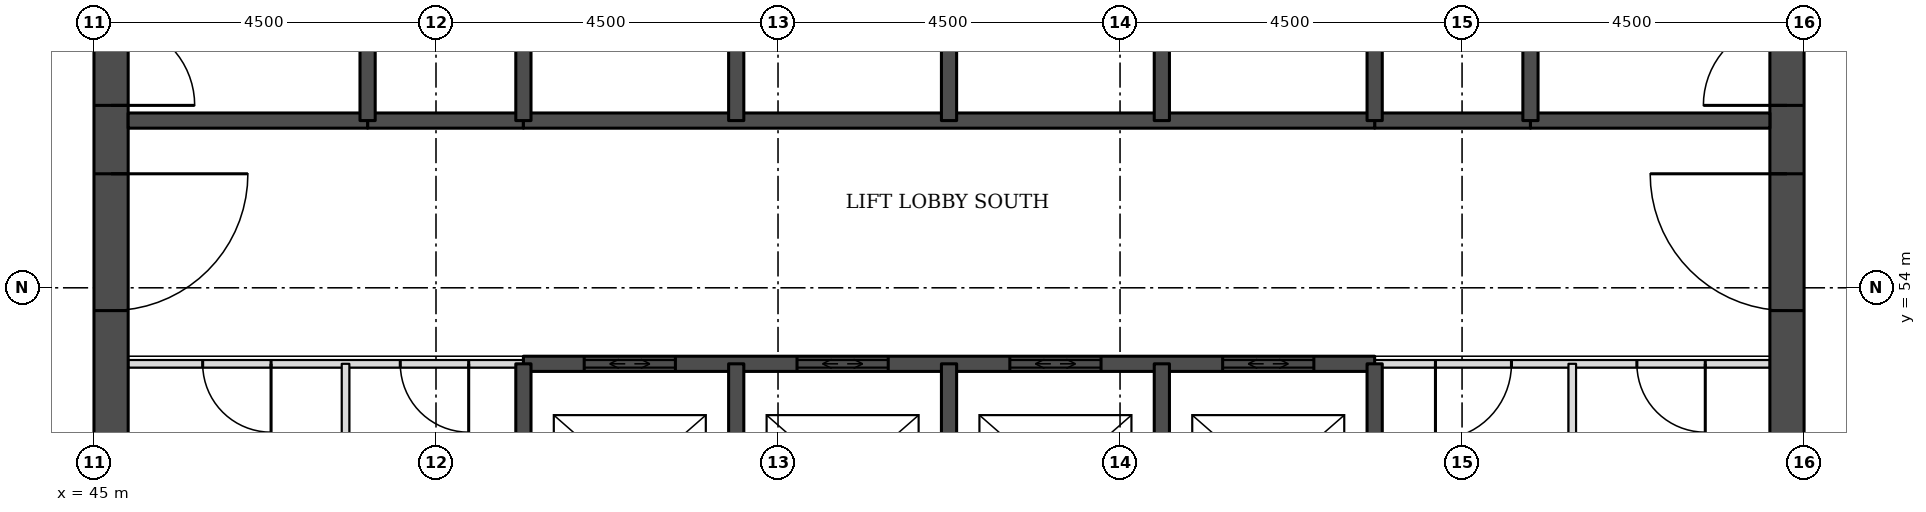
"""IFC4 building model, lengths in metres.
Left out: names, types, materials, properties, quantities, classifications, styles, units other than length and angle.
Written with IfcOpenShell. Run it as: python <this file> out.ifc"""

import sys

from ifc_helpers import new_model, si_unit, direction, frame, frame_2d, origin, place, context, subcontext, project, spatial, rectangle, extrude, element, fill, save


model = new_model("IFC4")
c1 = context("Model", 3, precision=1e-05, world=origin(), true_north=direction((0.0, 1.0)))
c2 = subcontext(c1, "Body", "Model", "MODEL_VIEW")
j1 = project(units=[si_unit("LENGTHUNIT", "METRE"), si_unit("PLANEANGLEUNIT", "RADIAN")], contexts=[c1])
p1 = place(None, origin())
s1 = spatial("IfcSite", under=j1, at=p1, CompositionType="ELEMENT")
p2 = place(p1, origin())
s2 = spatial("IfcBuilding", under=s1, at=p2, CompositionType="ELEMENT")
p3 = place(p2, frame((0.0, 0.0, 112.2)))
s3 = spatial("IfcBuildingStorey", under=s2, at=p3, CompositionType="ELEMENT", Elevation=112.2)
p4 = place(p3, frame((45.225, 49.5, 0.0), z_axis=(0.0, 0.0, 1.0), x_axis=(0.0, 1.0, 0.0)))
e1 = element("IfcWall", 1, at=p4, inside=s3, PredefinedType="SHEAR", context=c2, shape_type="SweptSolid", body=[
    extrude(rectangle(XDim=22.5, YDim=0.45, at=frame_2d((11.25, 0.0))), origin(), (0.0, 0.0, 1.0), 3.7),
])
p5 = place(p4, frame((4.2, 0.0, 0.0)))
e2 = element("IfcOpeningElement", 2, at=p5, cuts=e1, PredefinedType="OPENING", context=c2, shape_type="SweptSolid", body=[
    extrude(rectangle(XDim=1.8, YDim=2.1, at=frame_2d((0.9, 1.05))), frame((0.0, 0.235, 0.0), z_axis=(0.0, -1.0, 0.0), x_axis=(1.0, 0.0, 0.0)), (0.0, 0.0, 1.0), 0.47),
])
p6 = place(p4, frame((6.9, 0.0, 0.0)))
e3 = element("IfcOpeningElement", 3, at=p6, cuts=e1, PredefinedType="OPENING", context=c2, shape_type="SweptSolid", body=[
    extrude(rectangle(XDim=1.1, YDim=2.1, at=frame_2d((0.55, 1.05))), frame((0.0, 0.235, 0.0), z_axis=(0.0, -1.0, 0.0), x_axis=(1.0, 0.0, 0.0)), (0.0, 0.0, 1.0), 0.47),
])
p7 = place(p4, frame((13.6, 0.0, 0.0)))
e4 = element("IfcOpeningElement", 4, at=p7, cuts=e1, PredefinedType="OPENING", context=c2, shape_type="SweptSolid", body=[
    extrude(rectangle(XDim=1.1, YDim=2.1, at=frame_2d((0.55, 1.05))), frame((0.0, 0.235, 0.0), z_axis=(0.0, -1.0, 0.0), x_axis=(1.0, 0.0, 0.0)), (0.0, 0.0, 1.0), 0.47),
])
p8 = place(p4, frame((16.5, 0.0, 0.0)))
e5 = element("IfcOpeningElement", 5, at=p8, cuts=e1, PredefinedType="OPENING", context=c2, shape_type="SweptSolid", body=[
    extrude(rectangle(XDim=1.8, YDim=2.1, at=frame_2d((0.9, 1.05))), frame((0.0, 0.235, 0.0), z_axis=(0.0, -1.0, 0.0), x_axis=(1.0, 0.0, 0.0)), (0.0, 0.0, 1.0), 0.47),
])
p9 = place(p3, frame((67.275, 49.5, 0.0), z_axis=(0.0, 0.0, 1.0), x_axis=(0.0, 1.0, 0.0)))
e6 = element("IfcWall", 6, at=p9, inside=s3, PredefinedType="SHEAR", context=c2, shape_type="SweptSolid", body=[
    extrude(rectangle(XDim=22.5, YDim=0.45, at=frame_2d((11.25, 0.0))), origin(), (0.0, 0.0, 1.0), 3.7),
])
p10 = place(p9, frame((4.2, 0.0, 0.0)))
e7 = element("IfcOpeningElement", 7, at=p10, cuts=e6, PredefinedType="OPENING", context=c2, shape_type="SweptSolid", body=[
    extrude(rectangle(XDim=1.8, YDim=2.1, at=frame_2d((0.9, 1.05))), frame((0.0, 0.235, 0.0), z_axis=(0.0, -1.0, 0.0), x_axis=(1.0, 0.0, 0.0)), (0.0, 0.0, 1.0), 0.47),
])
p11 = place(p9, frame((6.9, 0.0, 0.0)))
e8 = element("IfcOpeningElement", 8, at=p11, cuts=e6, PredefinedType="OPENING", context=c2, shape_type="SweptSolid", body=[
    extrude(rectangle(XDim=1.1, YDim=2.1, at=frame_2d((0.55, 1.05))), frame((0.0, 0.235, 0.0), z_axis=(0.0, -1.0, 0.0), x_axis=(1.0, 0.0, 0.0)), (0.0, 0.0, 1.0), 0.47),
])
p12 = place(p9, frame((13.6, 0.0, 0.0)))
e9 = element("IfcOpeningElement", 9, at=p12, cuts=e6, PredefinedType="OPENING", context=c2, shape_type="SweptSolid", body=[
    extrude(rectangle(XDim=1.1, YDim=2.1, at=frame_2d((0.55, 1.05))), frame((0.0, 0.235, 0.0), z_axis=(0.0, -1.0, 0.0), x_axis=(1.0, 0.0, 0.0)), (0.0, 0.0, 1.0), 0.47),
])
p13 = place(p9, frame((16.5, 0.0, 0.0)))
e10 = element("IfcOpeningElement", 10, at=p13, cuts=e6, PredefinedType="OPENING", context=c2, shape_type="SweptSolid", body=[
    extrude(rectangle(XDim=1.8, YDim=2.1, at=frame_2d((0.9, 1.05))), frame((0.0, 0.235, 0.0), z_axis=(0.0, -1.0, 0.0), x_axis=(1.0, 0.0, 0.0)), (0.0, 0.0, 1.0), 0.47),
])
p14 = place(p3, frame((45.45, 53.0, 0.0), z_axis=(0.0, 0.0, 1.0), x_axis=(1.0, 0.0, 0.0)))
e11 = element("IfcWall", 11, at=p14, inside=s3, PredefinedType="PARTITIONING", context=c2, shape_type="SweptSolid", body=[
    extrude(rectangle(XDim=5.2, YDim=0.1, at=frame_2d((2.6, 0.0))), origin(), (0.0, 0.0, 1.0), 3.55),
])
p15 = place(p14, frame((0.98, 0.0, 0.0)))
e12 = element("IfcOpeningElement", 12, at=p15, cuts=e11, PredefinedType="OPENING", context=c2, shape_type="SweptSolid", body=[
    extrude(rectangle(XDim=0.9, YDim=2.1, at=frame_2d((0.45, 1.05))), frame((0.0, 0.06, 0.0), z_axis=(0.0, -1.0, 0.0), x_axis=(1.0, 0.0, 0.0)), (0.0, 0.0, 1.0), 0.12),
])
p16 = place(p14, frame((3.58, 0.0, 0.0)))
e13 = element("IfcOpeningElement", 13, at=p16, cuts=e11, PredefinedType="OPENING", context=c2, shape_type="SweptSolid", body=[
    extrude(rectangle(XDim=0.9, YDim=2.1, at=frame_2d((0.45, 1.05))), frame((0.0, 0.06, 0.0), z_axis=(0.0, -1.0, 0.0), x_axis=(1.0, 0.0, 0.0)), (0.0, 0.0, 1.0), 0.12),
])
p17 = place(p3, frame((61.85, 53.0, 0.0), z_axis=(0.0, 0.0, 1.0), x_axis=(1.0, 0.0, 0.0)))
e14 = element("IfcWall", 14, at=p17, inside=s3, PredefinedType="PARTITIONING", context=c2, shape_type="SweptSolid", body=[
    extrude(rectangle(XDim=5.2, YDim=0.1, at=frame_2d((2.6, 0.0))), origin(), (0.0, 0.0, 1.0), 3.55),
])
p18 = place(p17, frame((3.45, 0.0, 0.0)))
e15 = element("IfcOpeningElement", 15, at=p18, cuts=e14, PredefinedType="OPENING", context=c2, shape_type="SweptSolid", body=[
    extrude(rectangle(XDim=0.9, YDim=2.1, at=frame_2d((0.45, 1.05))), frame((0.0, 0.06, 0.0), z_axis=(0.0, -1.0, 0.0), x_axis=(1.0, 0.0, 0.0)), (0.0, 0.0, 1.0), 0.12),
])
p19 = place(p17, frame((0.8, 0.0, 0.0)))
e16 = element("IfcOpeningElement", 16, at=p19, cuts=e14, PredefinedType="OPENING", context=c2, shape_type="SweptSolid", body=[
    extrude(rectangle(XDim=1.0, YDim=2.1, at=frame_2d((0.5, 1.05))), frame((0.0, 0.06, 0.0), z_axis=(0.0, -1.0, 0.0), x_axis=(1.0, 0.0, 0.0)), (0.0, 0.0, 1.0), 0.12),
])
p20 = place(p3, frame((50.65, 53.0, 0.0), z_axis=(0.0, 0.0, 1.0), x_axis=(1.0, 0.0, 0.0)))
e17 = element("IfcWall", 17, at=p20, inside=s3, PredefinedType="SOLIDWALL", context=c2, shape_type="SweptSolid", body=[
    extrude(rectangle(XDim=11.2, YDim=0.2, at=frame_2d((5.6, 0.0))), origin(), (0.0, 0.0, 1.0), 3.55),
])
p21 = place(p20, frame((0.8, 0.0, 0.0)))
e18 = element("IfcOpeningElement", 18, at=p21, cuts=e17, PredefinedType="OPENING", context=c2, shape_type="SweptSolid", body=[
    extrude(rectangle(XDim=1.2, YDim=2.1, at=frame_2d((0.6, 1.05))), frame((0.0, 0.11, 0.0), z_axis=(0.0, -1.0, 0.0), x_axis=(1.0, 0.0, 0.0)), (0.0, 0.0, 1.0), 0.22),
])
p22 = place(p20, frame((3.6, 0.0, 0.0)))
e19 = element("IfcOpeningElement", 19, at=p22, cuts=e17, PredefinedType="OPENING", context=c2, shape_type="SweptSolid", body=[
    extrude(rectangle(XDim=1.2, YDim=2.1, at=frame_2d((0.6, 1.05))), frame((0.0, 0.11, 0.0), z_axis=(0.0, -1.0, 0.0), x_axis=(1.0, 0.0, 0.0)), (0.0, 0.0, 1.0), 0.22),
])
p23 = place(p20, frame((6.4, 0.0, 0.0)))
e20 = element("IfcOpeningElement", 20, at=p23, cuts=e17, PredefinedType="OPENING", context=c2, shape_type="SweptSolid", body=[
    extrude(rectangle(XDim=1.2, YDim=2.1, at=frame_2d((0.6, 1.05))), frame((0.0, 0.11, 0.0), z_axis=(0.0, -1.0, 0.0), x_axis=(1.0, 0.0, 0.0)), (0.0, 0.0, 1.0), 0.22),
])
p24 = place(p20, frame((9.2, 0.0, 0.0)))
e21 = element("IfcOpeningElement", 21, at=p24, cuts=e17, PredefinedType="OPENING", context=c2, shape_type="SweptSolid", body=[
    extrude(rectangle(XDim=1.2, YDim=2.1, at=frame_2d((0.6, 1.05))), frame((0.0, 0.11, 0.0), z_axis=(0.0, -1.0, 0.0), x_axis=(1.0, 0.0, 0.0)), (0.0, 0.0, 1.0), 0.22),
])
for number, where, z_axis, x_axis in (
    (22, (48.6, 56.2, 0.0), (0.0, 0.0, 1.0), (1.0, 0.0, 0.0)),
    (23, (61.85, 56.2, 0.0), (0.0, 0.0, 1.0), (1.0, 0.0, 0.0)),
):
    element("IfcWall", number, at=place(p3, frame(where, z_axis=z_axis, x_axis=x_axis)), inside=s3, PredefinedType="SOLIDWALL", context=c2, shape_type="SweptSolid", body=[
        extrude(rectangle(XDim=2.05, YDim=0.2, at=frame_2d((1.025, 0.0))), origin(), (0.0, 0.0, 1.0), 3.55),
    ])
p25 = place(p3, frame((45.45, 56.2, 0.0), z_axis=(0.0, 0.0, 1.0), x_axis=(1.0, 0.0, 0.0)))
e24 = element("IfcWall", 24, at=p25, inside=s3, PredefinedType="SOLIDWALL", context=c2, shape_type="SweptSolid", body=[
    extrude(rectangle(XDim=3.15, YDim=0.2, at=frame_2d((1.575, 0.0))), origin(), (0.0, 0.0, 1.0), 3.55),
])
p26 = place(p3, frame((50.65, 56.2, 0.0), z_axis=(0.0, 0.0, 1.0), x_axis=(1.0, 0.0, 0.0)))
e25 = element("IfcWall", 25, at=p26, inside=s3, PredefinedType="SOLIDWALL", context=c2, shape_type="SweptSolid", body=[
    extrude(rectangle(XDim=11.2, YDim=0.2, at=frame_2d((5.6, 0.0))), origin(), (0.0, 0.0, 1.0), 3.55),
])
p27 = place(p3, frame((63.9, 56.2, 0.0), z_axis=(0.0, 0.0, 1.0), x_axis=(1.0, 0.0, 0.0)))
e26 = element("IfcWall", 26, at=p27, inside=s3, PredefinedType="SOLIDWALL", context=c2, shape_type="SweptSolid", body=[
    extrude(rectangle(XDim=3.15, YDim=0.2, at=frame_2d((1.575, 0.0))), origin(), (0.0, 0.0, 1.0), 3.55),
])
p28 = place(p3, frame((48.31, 49.95, 0.0), z_axis=(0.0, 0.0, 1.0), x_axis=(0.0, 1.0, 0.0)))
e27 = element("IfcWall", 27, at=p28, inside=s3, PredefinedType="PARTITIONING", context=c2, shape_type="SweptSolid", body=[
    extrude(rectangle(XDim=3.05, YDim=0.1, at=frame_2d((1.525, 0.0))), origin(), (0.0, 0.0, 1.0), 3.55),
])
p29 = place(p3, frame((48.6, 56.2, 0.0), z_axis=(0.0, 0.0, 1.0), x_axis=(0.0, 1.0, 0.0)))
e28 = element("IfcWall", 28, at=p29, inside=s3, PredefinedType="SOLIDWALL", context=c2, shape_type="SweptSolid", body=[
    extrude(rectangle(XDim=5.8, YDim=0.2, at=frame_2d((2.9, 0.0))), origin(), (0.0, 0.0, 1.0), 3.55),
])
p30 = place(p3, frame((50.65, 49.95, 0.0), z_axis=(0.0, 0.0, 1.0), x_axis=(0.0, 1.0, 0.0)))
e29 = element("IfcWall", 29, at=p30, inside=s3, PredefinedType="SOLIDWALL", context=c2, shape_type="SweptSolid", body=[
    extrude(rectangle(XDim=3.05, YDim=0.2, at=frame_2d((1.525, 0.0))), origin(), (0.0, 0.0, 1.0), 3.55),
])
p31 = place(p3, frame((50.65, 56.2, 0.0), z_axis=(0.0, 0.0, 1.0), x_axis=(0.0, 1.0, 0.0)))
e30 = element("IfcWall", 30, at=p31, inside=s3, PredefinedType="SOLIDWALL", context=c2, shape_type="SweptSolid", body=[
    extrude(rectangle(XDim=2.8, YDim=0.2, at=frame_2d((1.4, 0.0))), origin(), (0.0, 0.0, 1.0), 3.55),
])
p32 = place(p3, frame((53.45, 49.95, 0.0), z_axis=(0.0, 0.0, 1.0), x_axis=(0.0, 1.0, 0.0)))
e31 = element("IfcWall", 31, at=p32, inside=s3, PredefinedType="SOLIDWALL", context=c2, shape_type="SweptSolid", body=[
    extrude(rectangle(XDim=3.05, YDim=0.2, at=frame_2d((1.525, 0.0))), origin(), (0.0, 0.0, 1.0), 3.55),
])
p33 = place(p3, frame((53.45, 56.2, 0.0), z_axis=(0.0, 0.0, 1.0), x_axis=(0.0, 1.0, 0.0)))
e32 = element("IfcWall", 32, at=p33, inside=s3, PredefinedType="SOLIDWALL", context=c2, shape_type="SweptSolid", body=[
    extrude(rectangle(XDim=2.8, YDim=0.2, at=frame_2d((1.4, 0.0))), origin(), (0.0, 0.0, 1.0), 3.55),
])
p34 = place(p3, frame((56.25, 49.95, 0.0), z_axis=(0.0, 0.0, 1.0), x_axis=(0.0, 1.0, 0.0)))
e33 = element("IfcWall", 33, at=p34, inside=s3, PredefinedType="SOLIDWALL", context=c2, shape_type="SweptSolid", body=[
    extrude(rectangle(XDim=3.05, YDim=0.2, at=frame_2d((1.525, 0.0))), origin(), (0.0, 0.0, 1.0), 3.55),
])
p35 = place(p3, frame((56.25, 56.2, 0.0), z_axis=(0.0, 0.0, 1.0), x_axis=(0.0, 1.0, 0.0)))
e34 = element("IfcWall", 34, at=p35, inside=s3, PredefinedType="SOLIDWALL", context=c2, shape_type="SweptSolid", body=[
    extrude(rectangle(XDim=2.8, YDim=0.2, at=frame_2d((1.4, 0.0))), origin(), (0.0, 0.0, 1.0), 3.55),
])
p36 = place(p3, frame((59.05, 49.95, 0.0), z_axis=(0.0, 0.0, 1.0), x_axis=(0.0, 1.0, 0.0)))
e35 = element("IfcWall", 35, at=p36, inside=s3, PredefinedType="SOLIDWALL", context=c2, shape_type="SweptSolid", body=[
    extrude(rectangle(XDim=3.05, YDim=0.2, at=frame_2d((1.525, 0.0))), origin(), (0.0, 0.0, 1.0), 3.55),
])
p37 = place(p3, frame((59.05, 56.2, 0.0), z_axis=(0.0, 0.0, 1.0), x_axis=(0.0, 1.0, 0.0)))
e36 = element("IfcWall", 36, at=p37, inside=s3, PredefinedType="SOLIDWALL", context=c2, shape_type="SweptSolid", body=[
    extrude(rectangle(XDim=2.8, YDim=0.2, at=frame_2d((1.4, 0.0))), origin(), (0.0, 0.0, 1.0), 3.55),
])
p38 = place(p3, frame((61.85, 49.95, 0.0), z_axis=(0.0, 0.0, 1.0), x_axis=(0.0, 1.0, 0.0)))
e37 = element("IfcWall", 37, at=p38, inside=s3, PredefinedType="SOLIDWALL", context=c2, shape_type="SweptSolid", body=[
    extrude(rectangle(XDim=3.05, YDim=0.2, at=frame_2d((1.525, 0.0))), origin(), (0.0, 0.0, 1.0), 3.55),
])
p39 = place(p3, frame((61.85, 56.2, 0.0), z_axis=(0.0, 0.0, 1.0), x_axis=(0.0, 1.0, 0.0)))
e38 = element("IfcWall", 38, at=p39, inside=s3, PredefinedType="SOLIDWALL", context=c2, shape_type="SweptSolid", body=[
    extrude(rectangle(XDim=2.8, YDim=0.2, at=frame_2d((1.4, 0.0))), origin(), (0.0, 0.0, 1.0), 3.55),
])
p40 = place(p3, frame((63.9, 56.2, 0.0), z_axis=(0.0, 0.0, 1.0), x_axis=(0.0, 1.0, 0.0)))
e39 = element("IfcWall", 39, at=p40, inside=s3, PredefinedType="SOLIDWALL", context=c2, shape_type="SweptSolid", body=[
    extrude(rectangle(XDim=5.8, YDim=0.2, at=frame_2d((2.9, 0.0))), origin(), (0.0, 0.0, 1.0), 3.55),
])
p41 = place(p3, frame((64.45, 49.95, 0.0), z_axis=(0.0, 0.0, 1.0), x_axis=(0.0, 1.0, 0.0)))
e40 = element("IfcWall", 40, at=p41, inside=s3, PredefinedType="PARTITIONING", context=c2, shape_type="SweptSolid", body=[
    extrude(rectangle(XDim=3.05, YDim=0.1, at=frame_2d((1.525, 0.0))), origin(), (0.0, 0.0, 1.0), 3.55),
])
p42 = place(p21, origin())
e41 = element("IfcDoor", 41, at=p42, inside=s3, OperationType="DOUBLE_DOOR_SLIDING", PredefinedType="DOOR", context=c2, shape_type="SweptSolid", body=[
    extrude(rectangle(XDim=1.2, YDim=2.1, at=frame_2d((0.6, 1.05))), frame((0.0, 0.025, 0.0), z_axis=(0.0, -1.0, 0.0), x_axis=(1.0, 0.0, 0.0)), (0.0, 0.0, 1.0), 0.05),
])
fill(e18, e41)
p43 = place(p22, origin())
e42 = element("IfcDoor", 42, at=p43, inside=s3, OperationType="DOUBLE_DOOR_SLIDING", PredefinedType="DOOR", context=c2, shape_type="SweptSolid", body=[
    extrude(rectangle(XDim=1.2, YDim=2.1, at=frame_2d((0.6, 1.05))), frame((0.0, 0.025, 0.0), z_axis=(0.0, -1.0, 0.0), x_axis=(1.0, 0.0, 0.0)), (0.0, 0.0, 1.0), 0.05),
])
fill(e19, e42)
p44 = place(p23, origin())
e43 = element("IfcDoor", 43, at=p44, inside=s3, OperationType="DOUBLE_DOOR_SLIDING", PredefinedType="DOOR", context=c2, shape_type="SweptSolid", body=[
    extrude(rectangle(XDim=1.2, YDim=2.1, at=frame_2d((0.6, 1.05))), frame((0.0, 0.025, 0.0), z_axis=(0.0, -1.0, 0.0), x_axis=(1.0, 0.0, 0.0)), (0.0, 0.0, 1.0), 0.05),
])
fill(e20, e43)
p45 = place(p24, origin())
e44 = element("IfcDoor", 44, at=p45, inside=s3, OperationType="DOUBLE_DOOR_SLIDING", PredefinedType="DOOR", context=c2, shape_type="SweptSolid", body=[
    extrude(rectangle(XDim=1.2, YDim=2.1, at=frame_2d((0.6, 1.05))), frame((0.0, 0.025, 0.0), z_axis=(0.0, -1.0, 0.0), x_axis=(1.0, 0.0, 0.0)), (0.0, 0.0, 1.0), 0.05),
])
fill(e21, e44)
p46 = place(p5, frame((1.8, 0.0, 0.0), z_axis=(0.0, 0.0, 1.0), x_axis=(-1.0, 0.0, 0.0)))
e45 = element("IfcDoor", 45, at=p46, inside=s3, OperationType="SINGLE_SWING_LEFT", PredefinedType="DOOR", context=c2, shape_type="SweptSolid", body=[
    extrude(rectangle(XDim=1.8, YDim=2.1, at=frame_2d((0.9, 1.05))), frame((0.0, 0.025, 0.0), z_axis=(0.0, -1.0, 0.0), x_axis=(1.0, 0.0, 0.0)), (0.0, 0.0, 1.0), 0.05),
])
fill(e2, e45)
p47 = place(p6, frame((1.1, 0.0, 0.0), z_axis=(0.0, 0.0, 1.0), x_axis=(-1.0, 0.0, 0.0)))
e46 = element("IfcDoor", 46, at=p47, inside=s3, OperationType="SINGLE_SWING_RIGHT", PredefinedType="DOOR", context=c2, shape_type="SweptSolid", body=[
    extrude(rectangle(XDim=1.1, YDim=2.1, at=frame_2d((0.55, 1.05))), frame((0.0, 0.025, 0.0), z_axis=(0.0, -1.0, 0.0), x_axis=(1.0, 0.0, 0.0)), (0.0, 0.0, 1.0), 0.05),
])
fill(e3, e46)
p48 = place(p10, origin())
e47 = element("IfcDoor", 47, at=p48, inside=s3, OperationType="SINGLE_SWING_RIGHT", PredefinedType="DOOR", context=c2, shape_type="SweptSolid", body=[
    extrude(rectangle(XDim=1.8, YDim=2.1, at=frame_2d((0.9, 1.05))), frame((0.0, 0.025, 0.0), z_axis=(0.0, -1.0, 0.0), x_axis=(1.0, 0.0, 0.0)), (0.0, 0.0, 1.0), 0.05),
])
fill(e7, e47)
p49 = place(p11, origin())
e48 = element("IfcDoor", 48, at=p49, inside=s3, OperationType="SINGLE_SWING_LEFT", PredefinedType="DOOR", context=c2, shape_type="SweptSolid", body=[
    extrude(rectangle(XDim=1.1, YDim=2.1, at=frame_2d((0.55, 1.05))), frame((0.0, 0.025, 0.0), z_axis=(0.0, -1.0, 0.0), x_axis=(1.0, 0.0, 0.0)), (0.0, 0.0, 1.0), 0.05),
])
fill(e8, e48)
p50 = place(p18, frame((0.9, 0.0, 0.0), z_axis=(0.0, 0.0, 1.0), x_axis=(-1.0, 0.0, 0.0)))
e49 = element("IfcDoor", 49, at=p50, inside=s3, OperationType="SINGLE_SWING_LEFT", PredefinedType="DOOR", context=c2, shape_type="SweptSolid", body=[
    extrude(rectangle(XDim=0.9, YDim=2.1, at=frame_2d((0.45, 1.05))), frame((0.0, 0.025, 0.0), z_axis=(0.0, -1.0, 0.0), x_axis=(1.0, 0.0, 0.0)), (0.0, 0.0, 1.0), 0.05),
])
fill(e15, e49)
p51 = place(p19, frame((1.0, 0.0, 0.0), z_axis=(0.0, 0.0, 1.0), x_axis=(-1.0, 0.0, 0.0)))
e50 = element("IfcDoor", 50, at=p51, inside=s3, OperationType="SINGLE_SWING_RIGHT", PredefinedType="DOOR", context=c2, shape_type="SweptSolid", body=[
    extrude(rectangle(XDim=1.0, YDim=2.1, at=frame_2d((0.5, 1.05))), frame((0.0, 0.025, 0.0), z_axis=(0.0, -1.0, 0.0), x_axis=(1.0, 0.0, 0.0)), (0.0, 0.0, 1.0), 0.05),
])
fill(e16, e50)
p52 = place(p15, frame((0.9, 0.0, 0.0), z_axis=(0.0, 0.0, 1.0), x_axis=(-1.0, 0.0, 0.0)))
e51 = element("IfcDoor", 51, at=p52, inside=s3, OperationType="SINGLE_SWING_LEFT", PredefinedType="DOOR", context=c2, shape_type="SweptSolid", body=[
    extrude(rectangle(XDim=0.9, YDim=2.1, at=frame_2d((0.45, 1.05))), frame((0.0, 0.025, 0.0), z_axis=(0.0, -1.0, 0.0), x_axis=(1.0, 0.0, 0.0)), (0.0, 0.0, 1.0), 0.05),
])
fill(e12, e51)
p53 = place(p16, frame((0.9, 0.0, 0.0), z_axis=(0.0, 0.0, 1.0), x_axis=(-1.0, 0.0, 0.0)))
e52 = element("IfcDoor", 52, at=p53, inside=s3, OperationType="SINGLE_SWING_LEFT", PredefinedType="DOOR", context=c2, shape_type="SweptSolid", body=[
    extrude(rectangle(XDim=0.9, YDim=2.1, at=frame_2d((0.45, 1.05))), frame((0.0, 0.025, 0.0), z_axis=(0.0, -1.0, 0.0), x_axis=(1.0, 0.0, 0.0)), (0.0, 0.0, 1.0), 0.05),
])
fill(e13, e52)
save(model, sys.argv[1])
